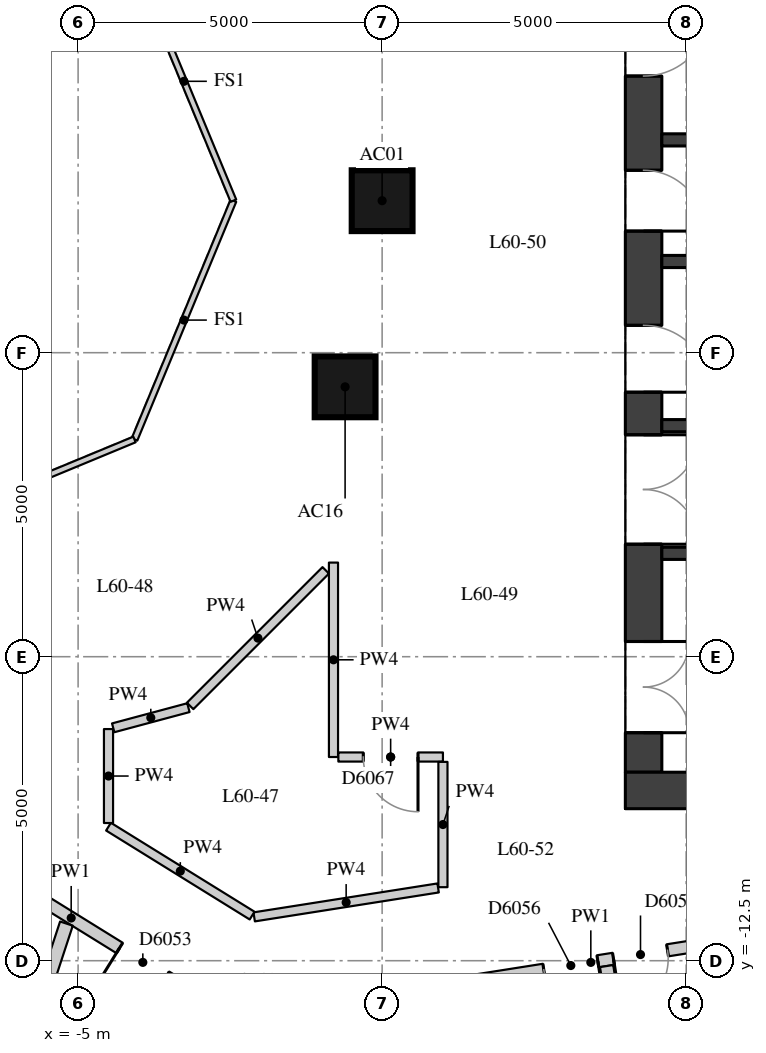
"""IFC4 building model, lengths in metres.
Left out: names, types, materials, properties, quantities, classifications, styles, units other than length and angle.
Written with IfcOpenShell. Run it as: python <this file> out.ifc"""

import sys

from ifc_helpers import new_model, si_unit, direction, frame, frame_2d, origin, origin_2d, place, context, subcontext, project, spatial, rectangle, extrude, element, fill, save


model = new_model("IFC4")
c1 = context("Model", 3, precision=1e-05, world=origin(), true_north=direction((0.0, 1.0)))
c2 = subcontext(c1, "Body", "Model", "MODEL_VIEW")
j1 = project(units=[si_unit("LENGTHUNIT", "METRE"), si_unit("PLANEANGLEUNIT", "RADIAN")], contexts=[c1])
p1 = place(None, origin())
s1 = spatial("IfcSite", under=j1, at=p1, CompositionType="ELEMENT")
p2 = place(p1, origin())
s2 = spatial("IfcBuilding", under=s1, at=p2, CompositionType="ELEMENT")
p3 = place(p2, frame((0.0, 0.0, 212.3)))
s3 = spatial("IfcBuildingStorey", under=s2, at=p3, CompositionType="ELEMENT", Elevation=212.3)
for number, where, z_axis, x_axis in (
    (1, (0.0, 0.0, 0.0), (0.0, 0.0, 1.0), (1.0, 0.0, 0.0)),
    (2, (-0.609, -3.062, 0.0), (0.0, 0.0, 1.0), (1.0, 0.0, 0.0)),
):
    element("IfcColumn", number, at=place(p3, frame(where, z_axis=z_axis, x_axis=x_axis)), inside=s3, PredefinedType="COLUMN", context=c2, shape_type="SweptSolid", body=[
        extrude(rectangle(XDim=1.0, YDim=1.0, at=origin_2d()), origin(), (0.0, 0.0, 1.0), 3.3),
    ])
p4 = place(p3, frame((4.3, -9.4, 0.0), z_axis=(0.0, 0.0, 1.0), x_axis=(0.0, 1.0, 0.0)))
e3 = element("IfcWall", 3, at=p4, inside=s3, PredefinedType="SHEAR", context=c2, shape_type="SweptSolid", body=[
    extrude(rectangle(XDim=18.8, YDim=0.6, at=frame_2d((9.4, 0.0))), origin(), (0.0, 0.0, 1.0), 3.02),
])
p5 = place(p4, frame((0.65, 0.0, 0.0)))
e4 = element("IfcOpeningElement", 4, at=p5, cuts=e3, PredefinedType="OPENING", context=c2, shape_type="SweptSolid", body=[
    extrude(rectangle(XDim=1.5, YDim=2.1, at=frame_2d((0.75, 1.05))), frame((0.0, 0.31, 0.0), z_axis=(0.0, -1.0, 0.0), x_axis=(1.0, 0.0, 0.0)), (0.0, 0.0, 1.0), 0.62),
])
p6 = place(p4, frame((3.75, 0.0, 0.0)))
e5 = element("IfcOpeningElement", 5, at=p6, cuts=e3, PredefinedType="OPENING", context=c2, shape_type="SweptSolid", body=[
    extrude(rectangle(XDim=1.8, YDim=2.1, at=frame_2d((0.9, 1.05))), frame((0.0, 0.31, 0.0), z_axis=(0.0, -1.0, 0.0), x_axis=(1.0, 0.0, 0.0)), (0.0, 0.0, 1.0), 0.62),
])
p7 = place(p4, frame((6.25, 0.0, 0.0)))
e6 = element("IfcOpeningElement", 6, at=p7, cuts=e3, PredefinedType="OPENING", context=c2, shape_type="SweptSolid", body=[
    extrude(rectangle(XDim=1.1, YDim=2.1, at=frame_2d((0.55, 1.05))), frame((0.0, 0.31, 0.0), z_axis=(0.0, -1.0, 0.0), x_axis=(1.0, 0.0, 0.0)), (0.0, 0.0, 1.0), 0.62),
])
p8 = place(p4, frame((8.9, 0.0, 0.0)))
e7 = element("IfcOpeningElement", 7, at=p8, cuts=e3, PredefinedType="OPENING", context=c2, shape_type="SweptSolid", body=[
    extrude(rectangle(XDim=1.0, YDim=2.1, at=frame_2d((0.5, 1.05))), frame((0.0, 0.31, 0.0), z_axis=(0.0, -1.0, 0.0), x_axis=(1.0, 0.0, 0.0)), (0.0, 0.0, 1.0), 0.62),
])
p9 = place(p4, frame((11.45, 0.0, 0.0)))
e8 = element("IfcOpeningElement", 8, at=p9, cuts=e3, PredefinedType="OPENING", context=c2, shape_type="SweptSolid", body=[
    extrude(rectangle(XDim=1.1, YDim=2.1, at=frame_2d((0.55, 1.05))), frame((0.0, 0.31, 0.0), z_axis=(0.0, -1.0, 0.0), x_axis=(1.0, 0.0, 0.0)), (0.0, 0.0, 1.0), 0.62),
])
p10 = place(p4, frame((13.25, 0.0, 0.0)))
e9 = element("IfcOpeningElement", 9, at=p10, cuts=e3, PredefinedType="OPENING", context=c2, shape_type="SweptSolid", body=[
    extrude(rectangle(XDim=1.8, YDim=2.1, at=frame_2d((0.9, 1.05))), frame((0.0, 0.31, 0.0), z_axis=(0.0, -1.0, 0.0), x_axis=(1.0, 0.0, 0.0)), (0.0, 0.0, 1.0), 0.62),
])
p11 = place(p4, frame((16.65, 0.0, 0.0)))
e10 = element("IfcOpeningElement", 10, at=p11, cuts=e3, PredefinedType="OPENING", context=c2, shape_type="SweptSolid", body=[
    extrude(rectangle(XDim=1.5, YDim=2.1, at=frame_2d((0.75, 1.05))), frame((0.0, 0.31, 0.0), z_axis=(0.0, -1.0, 0.0), x_axis=(1.0, 0.0, 0.0)), (0.0, 0.0, 1.0), 0.62),
])
p12 = place(p3, frame((4.0, -9.7, 0.0), z_axis=(0.0, 0.0, 1.0), x_axis=(1.0, 0.0, 0.0)))
e11 = element("IfcWall", 11, at=p12, inside=s3, PredefinedType="SHEAR", context=c2, shape_type="SweptSolid", body=[
    extrude(rectangle(XDim=12.0, YDim=0.6, at=frame_2d((6.0, 0.0))), origin(), (0.0, 0.0, 1.0), 3.02),
])
for number, where, z_axis, x_axis in (
    (12, (4.6, 1.0, 0.0), (0.0, 0.0, 1.0), (1.0, 0.0, 0.0)),
    (13, (4.6, -1.0, 0.0), (0.0, 0.0, 1.0), (1.0, 0.0, 0.0)),
):
    element("IfcWall", number, at=place(p3, frame(where, z_axis=z_axis, x_axis=x_axis)), inside=s3, PredefinedType="SHEAR", context=c2, shape_type="SweptSolid", body=[
        extrude(rectangle(XDim=10.8, YDim=0.2, at=frame_2d((5.4, 0.0))), origin(), (0.0, 0.0, 1.0), 3.02),
    ])
p13 = place(p3, frame((4.6, -3.7, 0.0), z_axis=(0.0, 0.0, 1.0), x_axis=(1.0, 0.0, 0.0)))
e14 = element("IfcWall", 14, at=p13, inside=s3, PredefinedType="SHEAR", context=c2, shape_type="SweptSolid", body=[
    extrude(rectangle(XDim=10.8, YDim=0.2, at=frame_2d((5.4, 0.0))), origin(), (0.0, 0.0, 1.0), 3.02),
])
p14 = place(p13, frame((6.6, 0.0, 0.0)))
e15 = element("IfcOpeningElement", 15, at=p14, cuts=e14, PredefinedType="OPENING", context=c2, shape_type="SweptSolid", body=[
    extrude(rectangle(XDim=1.1, YDim=2.1, at=frame_2d((0.55, 1.05))), frame((0.0, 0.11, 0.0), z_axis=(0.0, -1.0, 0.0), x_axis=(1.0, 0.0, 0.0)), (0.0, 0.0, 1.0), 0.22),
])
p15 = place(p13, frame((8.9, 0.0, 0.0)))
e16 = element("IfcOpeningElement", 16, at=p15, cuts=e14, PredefinedType="OPENING", context=c2, shape_type="SweptSolid", body=[
    extrude(rectangle(XDim=1.1, YDim=2.1, at=frame_2d((0.55, 1.05))), frame((0.0, 0.11, 0.0), z_axis=(0.0, -1.0, 0.0), x_axis=(1.0, 0.0, 0.0)), (0.0, 0.0, 1.0), 0.22),
])
p16 = place(p3, frame((4.6, -5.8, 0.0), z_axis=(0.0, 0.0, 1.0), x_axis=(1.0, 0.0, 0.0)))
e17 = element("IfcWall", 17, at=p16, inside=s3, PredefinedType="SHEAR", context=c2, shape_type="SweptSolid", body=[
    extrude(rectangle(XDim=10.8, YDim=0.2, at=frame_2d((5.4, 0.0))), origin(), (0.0, 0.0, 1.0), 3.02),
])
p17 = place(p3, frame((9.306, -11.603, 0.0), z_axis=(0.0, 0.0, 1.0), x_axis=(-0.987842562114, -0.155457622769, 0.0)))
e18 = element("IfcWall", 18, at=p17, inside=s3, PredefinedType="PARTITIONING", context=c2, shape_type="SweptSolid", body=[
    extrude(rectangle(XDim=11.893, YDim=0.2, at=frame_2d((5.947, 0.0))), origin(), (0.0, 0.0, 1.0), 3.02),
])
p18 = place(p17, frame((10.607, 0.0, 0.0)))
e19 = element("IfcOpeningElement", 19, at=p18, cuts=e18, PredefinedType="OPENING", context=c2, shape_type="SweptSolid", body=[
    extrude(rectangle(XDim=0.9, YDim=2.1, at=frame_2d((0.45, 1.05))), frame((0.0, 0.11, 0.0), z_axis=(0.0, -1.0, 0.0), x_axis=(1.0, 0.0, 0.0)), (0.0, 0.0, 1.0), 0.22),
])
p19 = place(p17, frame((5.829, 0.0, 0.0)))
e20 = element("IfcOpeningElement", 20, at=p19, cuts=e18, PredefinedType="OPENING", context=c2, shape_type="SweptSolid", body=[
    extrude(rectangle(XDim=0.9, YDim=2.1, at=frame_2d((0.45, 1.05))), frame((0.0, 0.11, 0.0), z_axis=(0.0, -1.0, 0.0), x_axis=(1.0, 0.0, 0.0)), (0.0, 0.0, 1.0), 0.22),
])
p20 = place(p17, frame((4.669, 0.0, 0.0)))
e21 = element("IfcOpeningElement", 21, at=p20, cuts=e18, PredefinedType="OPENING", context=c2, shape_type="SweptSolid", body=[
    extrude(rectangle(XDim=0.9, YDim=2.1, at=frame_2d((0.45, 1.05))), frame((0.0, 0.11, 0.0), z_axis=(0.0, -1.0, 0.0), x_axis=(1.0, 0.0, 0.0)), (0.0, 0.0, 1.0), 0.22),
])
p21 = place(p17, frame((0.14, 0.0, 0.0)))
e22 = element("IfcOpeningElement", 22, at=p21, cuts=e18, PredefinedType="OPENING", context=c2, shape_type="SweptSolid", body=[
    extrude(rectangle(XDim=1.1, YDim=2.1, at=frame_2d((0.55, 1.05))), frame((0.0, 0.11, 0.0), z_axis=(0.0, -1.0, 0.0), x_axis=(1.0, 0.0, 0.0)), (0.0, 0.0, 1.0), 0.22),
])
p22 = place(p3, frame((-2.528, -13.4, 0.0), z_axis=(0.0, 0.0, 1.0), x_axis=(-0.850088088191, 0.526640524757, 0.0)))
e23 = element("IfcWall", 23, at=p22, inside=s3, PredefinedType="PARTITIONING", context=c2, shape_type="SweptSolid", body=[
    extrude(rectangle(XDim=6.084, YDim=0.2, at=frame_2d((3.042, 0.0))), origin(), (0.0, 0.0, 1.0), 3.02),
])
p23 = place(p22, frame((4.031, 0.0, 0.0)))
e24 = element("IfcOpeningElement", 24, at=p23, cuts=e23, PredefinedType="OPENING", context=c2, shape_type="SweptSolid", body=[
    extrude(rectangle(XDim=1.1, YDim=2.1, at=frame_2d((0.55, 1.05))), frame((0.0, 0.11, 0.0), z_axis=(0.0, -1.0, 0.0), x_axis=(1.0, 0.0, 0.0)), (0.0, 0.0, 1.0), 0.22),
])
p24 = place(p22, frame((1.206, 0.0, 0.0)))
e25 = element("IfcOpeningElement", 25, at=p24, cuts=e23, PredefinedType="OPENING", context=c2, shape_type="SweptSolid", body=[
    extrude(rectangle(XDim=0.9, YDim=2.1, at=frame_2d((0.45, 1.05))), frame((0.0, 0.11, 0.0), z_axis=(0.0, -1.0, 0.0), x_axis=(1.0, 0.0, 0.0)), (0.0, 0.0, 1.0), 0.22),
])
p25 = place(p3, frame((-0.8, -5.952, 0.0), z_axis=(0.0, 0.0, 1.0), x_axis=(0.0, -1.0, 0.0)))
e26 = element("IfcWall", 26, at=p25, inside=s3, PredefinedType="PARTITIONING", context=c2, shape_type="SweptSolid", body=[
    extrude(rectangle(XDim=3.198, YDim=0.15, at=frame_2d((1.599, 0.0))), origin(), (0.0, 0.0, 1.0), 3.02),
])
p26 = place(p3, frame((-0.72, -9.15, 0.0), z_axis=(0.0, 0.0, 1.0), x_axis=(1.0, 0.0, 0.0)))
e27 = element("IfcWall", 27, at=p26, inside=s3, PredefinedType="PARTITIONING", context=c2, shape_type="SweptSolid", body=[
    extrude(rectangle(XDim=1.72, YDim=0.15, at=frame_2d((0.86, 0.0))), origin(), (0.0, 0.0, 1.0), 3.02),
])
p27 = place(p26, frame((0.41, 0.0, 0.0)))
e28 = element("IfcOpeningElement", 28, at=p27, cuts=e27, PredefinedType="OPENING", context=c2, shape_type="SweptSolid", body=[
    extrude(rectangle(XDim=0.9, YDim=2.1, at=frame_2d((0.45, 1.05))), frame((0.0, 0.085, 0.0), z_axis=(0.0, -1.0, 0.0), x_axis=(1.0, 0.0, 0.0)), (0.0, 0.0, 1.0), 0.17),
])
p28 = place(p3, frame((1.0, -9.23, 0.0), z_axis=(0.0, 0.0, 1.0), x_axis=(0.0, -1.0, 0.0)))
e29 = element("IfcWall", 29, at=p28, inside=s3, PredefinedType="PARTITIONING", context=c2, shape_type="SweptSolid", body=[
    extrude(rectangle(XDim=2.061, YDim=0.15, at=frame_2d((1.03, 0.0))), origin(), (0.0, 0.0, 1.0), 3.02),
])
p29 = place(p3, frame((0.921, -11.303, 0.0), z_axis=(0.0, 0.0, 1.0), x_axis=(-0.987854584084, -0.15538121091, 0.0)))
e30 = element("IfcWall", 30, at=p29, inside=s3, PredefinedType="PARTITIONING", context=c2, shape_type="SweptSolid", body=[
    extrude(rectangle(XDim=3.062, YDim=0.15, at=frame_2d((1.531, 0.0))), origin(), (0.0, 0.0, 1.0), 3.02),
])
p30 = place(p3, frame((-2.138, -11.758, 0.0), z_axis=(0.0, 0.0, 1.0), x_axis=(-0.850109654363, 0.526605711666, 0.0)))
e31 = element("IfcWall", 31, at=p30, inside=s3, PredefinedType="PARTITIONING", context=c2, shape_type="SweptSolid", body=[
    extrude(rectangle(XDim=2.778, YDim=0.15, at=frame_2d((1.389, 0.0))), origin(), (0.0, 0.0, 1.0), 3.02),
])
p31 = place(p3, frame((-4.5, -10.235, 0.0), z_axis=(0.0, 0.0, 1.0), x_axis=(0.0, 1.0, 0.0)))
e32 = element("IfcWall", 32, at=p31, inside=s3, PredefinedType="PARTITIONING", context=c2, shape_type="SweptSolid", body=[
    extrude(rectangle(XDim=1.545, YDim=0.15, at=frame_2d((0.772, 0.0))), origin(), (0.0, 0.0, 1.0), 3.02),
])
p32 = place(p3, frame((-4.423, -8.67, 0.0), z_axis=(0.0, 0.0, 1.0), x_axis=(0.965898680525, 0.258920333232, 0.0)))
e33 = element("IfcWall", 33, at=p32, inside=s3, PredefinedType="PARTITIONING", context=c2, shape_type="SweptSolid", body=[
    extrude(rectangle(XDim=1.281, YDim=0.15, at=frame_2d((0.64, 0.0))), origin(), (0.0, 0.0, 1.0), 3.02),
])
p33 = place(p3, frame((-3.158, -8.31, 0.0), z_axis=(0.0, 0.0, 1.0), x_axis=(0.707106781187, 0.707106781187, 0.0)))
e34 = element("IfcWall", 34, at=p33, inside=s3, PredefinedType="PARTITIONING", context=c2, shape_type="SweptSolid", body=[
    extrude(rectangle(XDim=3.154, YDim=0.15, at=frame_2d((1.577, 0.0))), origin(), (0.0, 0.0, 1.0), 3.02),
])
p34 = place(p3, frame((-7.508, -18.944, 0.0), z_axis=(0.0, 0.0, 1.0), x_axis=(0.311962912662, 0.950094280124, 0.0)))
e35 = element("IfcWall", 35, at=p34, inside=s3, PredefinedType="PARTITIONING", context=c2, shape_type="SweptSolid", body=[
    extrude(rectangle(XDim=7.425, YDim=0.22, at=frame_2d((3.712, 0.0))), origin(), (0.0, 0.0, 1.0), 3.02),
])
p35 = place(p3, frame((5.071, -21.256, 0.0), z_axis=(0.0, 0.0, 1.0), x_axis=(-0.157132312818, 0.987577559622, 0.0)))
e36 = element("IfcWall", 36, at=p35, inside=s3, PredefinedType="PARTITIONING", context=c2, shape_type="SweptSolid", body=[
    extrude(rectangle(XDim=8.777, YDim=0.22, at=frame_2d((4.389, 0.0))), origin(), (0.0, 0.0, 1.0), 3.02),
])
for number, where, z_axis, x_axis in (
    (37, (-2.446, 0.0, 0.0), (0.0, 0.0, 1.0), (-0.383, -0.924, 0.0)),
    (38, (-4.073, -3.927, 0.0), (0.0, 0.0, 1.0), (-0.924, -0.383, 0.0)),
    (39, (-4.073, 3.927, 0.0), (0.0, 0.0, 1.0), (0.383, -0.924, 0.0)),
):
    element("IfcWall", number, at=place(p3, frame(where, z_axis=z_axis, x_axis=x_axis)), inside=s3, PredefinedType="PARTITIONING", context=c2, shape_type="SweptSolid", body=[
        extrude(rectangle(XDim=4.251, YDim=0.1, at=frame_2d((2.125, 0.0))), origin(), (0.0, 0.0, 1.0), 3.02),
    ])
p36 = place(p5, origin())
e40 = element("IfcDoor", 40, at=p36, inside=s3, OperationType="DOUBLE_DOOR_SINGLE_SWING", PredefinedType="DOOR", context=c2, shape_type="SweptSolid", body=[
    extrude(rectangle(XDim=1.5, YDim=2.1, at=frame_2d((0.75, 1.05))), frame((0.0, 0.025, 0.0), z_axis=(0.0, -1.0, 0.0), x_axis=(1.0, 0.0, 0.0)), (0.0, 0.0, 1.0), 0.05),
])
fill(e4, e40)
p37 = place(p6, origin())
e41 = element("IfcDoor", 41, at=p37, inside=s3, OperationType="DOUBLE_DOOR_SINGLE_SWING", PredefinedType="DOOR", context=c2, shape_type="SweptSolid", body=[
    extrude(rectangle(XDim=1.8, YDim=2.1, at=frame_2d((0.9, 1.05))), frame((0.0, 0.025, 0.0), z_axis=(0.0, -1.0, 0.0), x_axis=(1.0, 0.0, 0.0)), (0.0, 0.0, 1.0), 0.05),
])
fill(e5, e41)
p38 = place(p7, origin())
e42 = element("IfcDoor", 42, at=p38, inside=s3, OperationType="SINGLE_SWING_RIGHT", PredefinedType="DOOR", context=c2, shape_type="SweptSolid", body=[
    extrude(rectangle(XDim=1.1, YDim=2.1, at=frame_2d((0.55, 1.05))), frame((0.0, 0.025, 0.0), z_axis=(0.0, -1.0, 0.0), x_axis=(1.0, 0.0, 0.0)), (0.0, 0.0, 1.0), 0.05),
])
fill(e6, e42)
p39 = place(p8, origin())
e43 = element("IfcDoor", 43, at=p39, inside=s3, OperationType="SINGLE_SWING_RIGHT", PredefinedType="DOOR", context=c2, shape_type="SweptSolid", body=[
    extrude(rectangle(XDim=1.0, YDim=2.1, at=frame_2d((0.5, 1.05))), frame((0.0, 0.025, 0.0), z_axis=(0.0, -1.0, 0.0), x_axis=(1.0, 0.0, 0.0)), (0.0, 0.0, 1.0), 0.05),
])
fill(e7, e43)
p40 = place(p9, origin())
e44 = element("IfcDoor", 44, at=p40, inside=s3, OperationType="SINGLE_SWING_LEFT", PredefinedType="DOOR", context=c2, shape_type="SweptSolid", body=[
    extrude(rectangle(XDim=1.1, YDim=2.1, at=frame_2d((0.55, 1.05))), frame((0.0, 0.025, 0.0), z_axis=(0.0, -1.0, 0.0), x_axis=(1.0, 0.0, 0.0)), (0.0, 0.0, 1.0), 0.05),
])
fill(e8, e44)
p41 = place(p24, origin())
e45 = element("IfcDoor", 45, at=p41, inside=s3, OperationType="SINGLE_SWING_RIGHT", PredefinedType="DOOR", context=c2, shape_type="SweptSolid", body=[
    extrude(rectangle(XDim=0.9, YDim=2.1, at=frame_2d((0.45, 1.05))), frame((0.0, 0.025, 0.0), z_axis=(0.0, -1.0, 0.0), x_axis=(1.0, 0.0, 0.0)), (0.0, 0.0, 1.0), 0.05),
])
fill(e25, e45)
p42 = place(p19, origin())
e46 = element("IfcDoor", 46, at=p42, inside=s3, OperationType="SINGLE_SWING_LEFT", PredefinedType="DOOR", context=c2, shape_type="SweptSolid", body=[
    extrude(rectangle(XDim=0.9, YDim=2.1, at=frame_2d((0.45, 1.05))), frame((0.0, 0.025, 0.0), z_axis=(0.0, -1.0, 0.0), x_axis=(1.0, 0.0, 0.0)), (0.0, 0.0, 1.0), 0.05),
])
fill(e20, e46)
p43 = place(p20, origin())
e47 = element("IfcDoor", 47, at=p43, inside=s3, OperationType="SINGLE_SWING_RIGHT", PredefinedType="DOOR", context=c2, shape_type="SweptSolid", body=[
    extrude(rectangle(XDim=0.9, YDim=2.1, at=frame_2d((0.45, 1.05))), frame((0.0, 0.025, 0.0), z_axis=(0.0, -1.0, 0.0), x_axis=(1.0, 0.0, 0.0)), (0.0, 0.0, 1.0), 0.05),
])
fill(e21, e47)
p44 = place(p27, origin())
e48 = element("IfcDoor", 48, at=p44, inside=s3, OperationType="SINGLE_SWING_LEFT", PredefinedType="DOOR", context=c2, shape_type="SweptSolid", body=[
    extrude(rectangle(XDim=0.9, YDim=2.1, at=frame_2d((0.45, 1.05))), frame((0.0, 0.025, 0.0), z_axis=(0.0, -1.0, 0.0), x_axis=(1.0, 0.0, 0.0)), (0.0, 0.0, 1.0), 0.05),
])
fill(e28, e48)
save(model, sys.argv[1])
